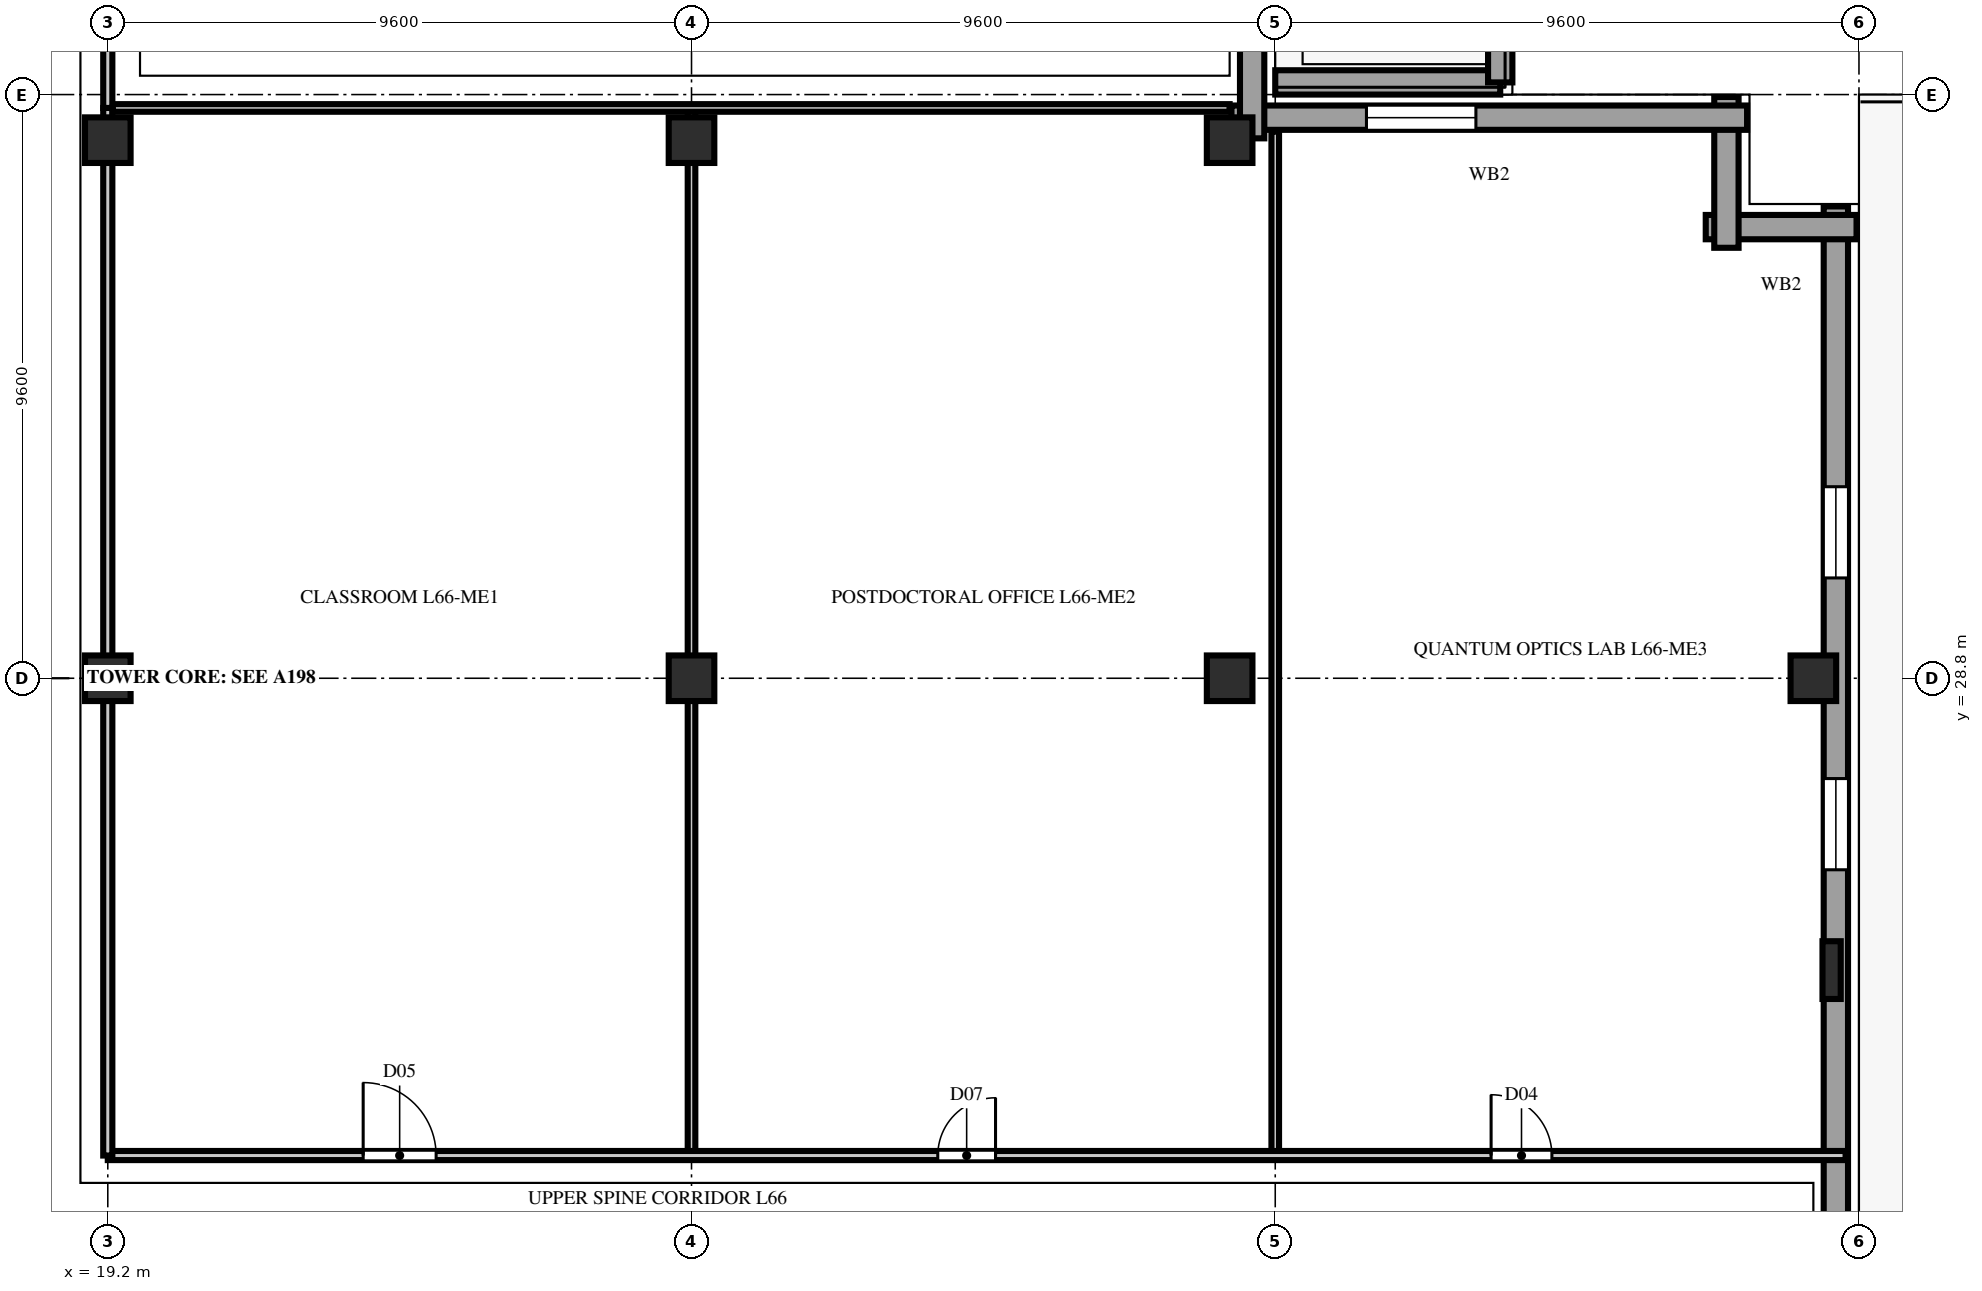
"""IFC4 building model, lengths in metres.
Left out: names, types, materials, properties, quantities, classifications, styles, units other than length and angle.
Written with IfcOpenShell. Run it as: python <this file> out.ifc"""

import sys

from ifc_helpers import new_model, si_unit, direction, frame, frame_2d, origin, origin_2d, place, context, subcontext, project, spatial, rectangle, extrude, element, fill, save


model = new_model("IFC4")
c1 = context("Model", 3, precision=1e-05, world=origin(), true_north=direction((0.0, 1.0)))
c2 = subcontext(c1, "Body", "Model", "MODEL_VIEW")
j1 = project(units=[si_unit("LENGTHUNIT", "METRE"), si_unit("PLANEANGLEUNIT", "RADIAN")], contexts=[c1])
p1 = place(None, origin())
s1 = spatial("IfcSite", under=j1, at=p1, CompositionType="ELEMENT")
p2 = place(p1, origin())
s2 = spatial("IfcBuilding", under=s1, at=p2, CompositionType="ELEMENT")
p3 = place(p2, frame((0.0, 0.0, 261.0)))
s3 = spatial("IfcBuildingStorey", under=s2, at=p3, CompositionType="ELEMENT", Elevation=261.0)
for number, where, z_axis, x_axis in (
    (1, (19.2, 28.8, 0.0), (0.0, 0.0, 1.0), (1.0, 0.0, 0.0)),
    (2, (19.2, 37.65, 0.0), (0.0, 0.0, 1.0), (1.0, 0.0, 0.0)),
    (3, (28.8, 28.8, 0.0), (0.0, 0.0, 1.0), (1.0, 0.0, 0.0)),
    (4, (28.8, 37.65, 0.0), (0.0, 0.0, 1.0), (1.0, 0.0, 0.0)),
    (5, (37.65, 28.8, 0.0), (0.0, 0.0, 1.0), (1.0, 0.0, 0.0)),
    (6, (37.65, 37.65, 0.0), (0.0, 0.0, 1.0), (1.0, 0.0, 0.0)),
    (7, (47.25, 28.8, 0.0), (0.0, 0.0, 1.0), (1.0, 0.0, 0.0)),
):
    element("IfcColumn", number, at=place(p3, frame(where, z_axis=z_axis, x_axis=x_axis)), inside=s3, PredefinedType="COLUMN", context=c2, shape_type="SweptSolid", body=[
        extrude(rectangle(XDim=0.75, YDim=0.75, at=origin_2d()), origin(), (0.0, 0.0, 1.0), 4.8),
    ])
p4 = place(p3, frame((47.55, 24.0, 0.0), z_axis=(0.0, 0.0, 1.0), x_axis=(0.0, 1.0, 0.0)))
e8 = element("IfcColumn", 8, at=p4, inside=s3, PredefinedType="PILASTER", context=c2, shape_type="SweptSolid", body=[
    extrude(rectangle(XDim=0.95, YDim=0.3, at=origin_2d()), origin(), (0.0, 0.0, 1.0), 4.8),
])
p5 = place(p3, frame((47.62, 1.84, 0.0), z_axis=(0.0, 0.0, 1.0), x_axis=(0.0, 1.0, 0.0)))
e9 = element("IfcWall", 9, at=p5, inside=s3, PredefinedType="SOLIDWALL", context=c2, shape_type="SweptSolid", body=[
    extrude(rectangle(XDim=34.72, YDim=0.4, at=frame_2d((17.36, 0.0))), origin(), (0.0, 0.0, 1.0), 4.54),
])
p6 = place(p5, frame((13.26, 0.0, 0.0)))
e10 = element("IfcOpeningElement", 10, at=p6, cuts=e9, PredefinedType="OPENING", context=c2, shape_type="SweptSolid", body=[
    extrude(rectangle(XDim=1.6, YDim=2.3, at=frame_2d((0.8, 1.15))), frame((0.0, 0.212, 0.0), z_axis=(0.0, -1.0, 0.0), x_axis=(1.0, 0.0, 0.0)), (0.0, 0.0, 1.0), 0.424),
])
p7 = place(p5, frame((4.61, 0.0, 0.85)))
e11 = element("IfcOpeningElement", 11, at=p7, cuts=e9, PredefinedType="OPENING", context=c2, shape_type="SweptSolid", body=[
    extrude(rectangle(XDim=1.5, YDim=1.85, at=frame_2d((0.75, 0.925))), frame((0.0, 0.212, 0.0), z_axis=(0.0, -1.0, 0.0), x_axis=(1.0, 0.0, 0.0)), (0.0, 0.0, 1.0), 0.424),
])
p8 = place(p5, frame((9.41, 0.0, 0.85)))
e12 = element("IfcOpeningElement", 12, at=p8, cuts=e9, PredefinedType="OPENING", context=c2, shape_type="SweptSolid", body=[
    extrude(rectangle(XDim=1.5, YDim=1.85, at=frame_2d((0.75, 0.925))), frame((0.0, 0.212, 0.0), z_axis=(0.0, -1.0, 0.0), x_axis=(1.0, 0.0, 0.0)), (0.0, 0.0, 1.0), 0.424),
])
p9 = place(p5, frame((23.81, 0.0, 0.85)))
e13 = element("IfcOpeningElement", 13, at=p9, cuts=e9, PredefinedType="OPENING", context=c2, shape_type="SweptSolid", body=[
    extrude(rectangle(XDim=1.5, YDim=1.85, at=frame_2d((0.75, 0.925))), frame((0.0, 0.212, 0.0), z_axis=(0.0, -1.0, 0.0), x_axis=(1.0, 0.0, 0.0)), (0.0, 0.0, 1.0), 0.424),
])
p10 = place(p5, frame((28.61, 0.0, 0.85)))
e14 = element("IfcOpeningElement", 14, at=p10, cuts=e9, PredefinedType="OPENING", context=c2, shape_type="SweptSolid", body=[
    extrude(rectangle(XDim=1.5, YDim=1.85, at=frame_2d((0.75, 0.925))), frame((0.0, 0.212, 0.0), z_axis=(0.0, -1.0, 0.0), x_axis=(1.0, 0.0, 0.0)), (0.0, 0.0, 1.0), 0.424),
])
p11 = place(p3, frame((47.96, 36.22, 0.0), z_axis=(0.0, 0.0, 1.0), x_axis=(-1.0, 0.0, 0.0)))
e15 = element("IfcWall", 15, at=p11, inside=s3, PredefinedType="SOLIDWALL", context=c2, shape_type="SweptSolid", body=[
    extrude(rectangle(XDim=2.48, YDim=0.4, at=frame_2d((1.24, 0.0))), origin(), (0.0, 0.0, 1.0), 4.54),
])
p12 = place(p3, frame((45.82, 35.88, 0.0), z_axis=(0.0, 0.0, 1.0), x_axis=(0.0, 1.0, 0.0)))
e16 = element("IfcWall", 16, at=p12, inside=s3, PredefinedType="SOLIDWALL", context=c2, shape_type="SweptSolid", body=[
    extrude(rectangle(XDim=2.48, YDim=0.4, at=frame_2d((1.24, 0.0))), origin(), (0.0, 0.0, 1.0), 4.54),
])
p13 = place(p3, frame((46.16, 38.02, 0.0), z_axis=(0.0, 0.0, 1.0), x_axis=(-1.0, 0.0, 0.0)))
e17 = element("IfcWall", 17, at=p13, inside=s3, PredefinedType="SOLIDWALL", context=c2, shape_type="SweptSolid", body=[
    extrude(rectangle(XDim=8.48, YDim=0.4, at=frame_2d((4.24, 0.0))), origin(), (0.0, 0.0, 1.0), 4.54),
])
p14 = place(p13, frame((4.46, 0.0, 0.85)))
e18 = element("IfcOpeningElement", 18, at=p14, cuts=e17, PredefinedType="OPENING", context=c2, shape_type="SweptSolid", body=[
    extrude(rectangle(XDim=1.8, YDim=1.85, at=frame_2d((0.9, 0.925))), frame((0.0, 0.212, 0.0), z_axis=(0.0, -1.0, 0.0), x_axis=(1.0, 0.0, 0.0)), (0.0, 0.0, 1.0), 0.424),
])
p15 = place(p3, frame((38.02, 37.68, 0.0), z_axis=(0.0, 0.0, 1.0), x_axis=(0.0, 1.0, 0.0)))
e19 = element("IfcWall", 19, at=p15, inside=s3, PredefinedType="SOLIDWALL", context=c2, shape_type="SweptSolid", body=[
    extrude(rectangle(XDim=8.48, YDim=0.4, at=frame_2d((4.24, 0.0))), origin(), (0.0, 0.0, 1.0), 4.54),
])
p16 = place(p15, frame((3.72, 0.0, 0.0)))
e20 = element("IfcOpeningElement", 20, at=p16, cuts=e19, PredefinedType="OPENING", context=c2, shape_type="SweptSolid", body=[
    extrude(rectangle(XDim=1.6, YDim=2.3, at=frame_2d((0.8, 1.15))), frame((0.0, 0.212, 0.0), z_axis=(0.0, -1.0, 0.0), x_axis=(1.0, 0.0, 0.0)), (0.0, 0.0, 1.0), 0.424),
])
p17 = place(p3, frame((38.4, 38.6, 0.0), z_axis=(0.0, 0.0, 1.0), x_axis=(1.0, 0.0, 0.0)))
e21 = element("IfcWall", 21, at=p17, inside=s3, PredefinedType="SOLIDWALL", context=c2, shape_type="SweptSolid", body=[
    extrude(rectangle(XDim=3.7, YDim=0.4, at=frame_2d((1.85, 0.0))), origin(), (0.0, 0.0, 1.0), 1.45),
])
p18 = place(p3, frame((42.1, 38.6, 0.0), z_axis=(0.0, 0.0, 1.0), x_axis=(0.0, 1.0, 0.0)))
e22 = element("IfcWall", 22, at=p18, inside=s3, PredefinedType="SOLIDWALL", context=c2, shape_type="SweptSolid", body=[
    extrude(rectangle(XDim=1.2, YDim=0.4, at=frame_2d((0.6, 0.0))), origin(), (0.0, 0.0, 1.0), 1.45),
])
p19 = place(p3, frame((28.8, 20.95, 0.0), z_axis=(0.0, 0.0, 1.0), x_axis=(0.0, 1.0, 0.0)))
e23 = element("IfcWall", 23, at=p19, inside=s3, PredefinedType="PARTITIONING", context=c2, shape_type="SweptSolid", body=[
    extrude(rectangle(XDim=17.23, YDim=0.125, at=frame_2d((8.615, 0.0))), origin(), (0.0, 0.0, 1.0), 3.628),
])
p20 = place(p3, frame((38.4, 20.95, 0.0), z_axis=(0.0, 0.0, 1.0), x_axis=(0.0, 1.0, 0.0)))
e24 = element("IfcWall", 24, at=p20, inside=s3, PredefinedType="PARTITIONING", context=c2, shape_type="SweptSolid", body=[
    extrude(rectangle(XDim=16.84, YDim=0.125, at=frame_2d((8.42, 0.0))), origin(), (0.0, 0.0, 1.0), 4.54),
])
p21 = place(p3, frame((19.2, 20.95, 0.0), z_axis=(0.0, 0.0, 1.0), x_axis=(1.0, 0.0, 0.0)))
e25 = element("IfcWall", 25, at=p21, inside=s3, PredefinedType="PARTITIONING", context=c2, shape_type="SweptSolid", body=[
    extrude(rectangle(XDim=28.58, YDim=0.15, at=frame_2d((14.29, 0.0))), origin(), (0.0, 0.0, 1.0), 4.54),
])
p22 = place(p21, frame((4.2, 0.0, 0.0)))
e26 = element("IfcOpeningElement", 26, at=p22, cuts=e25, PredefinedType="OPENING", context=c2, shape_type="SweptSolid", body=[
    extrude(rectangle(XDim=1.2, YDim=2.2, at=frame_2d((0.6, 1.1))), frame((0.0, 0.087, 0.0), z_axis=(0.0, -1.0, 0.0), x_axis=(1.0, 0.0, 0.0)), (0.0, 0.0, 1.0), 0.174),
])
p23 = place(p21, frame((13.65, 0.0, 0.0)))
e27 = element("IfcOpeningElement", 27, at=p23, cuts=e25, PredefinedType="OPENING", context=c2, shape_type="SweptSolid", body=[
    extrude(rectangle(XDim=0.95, YDim=2.15, at=frame_2d((0.475, 1.075))), frame((0.0, 0.087, 0.0), z_axis=(0.0, -1.0, 0.0), x_axis=(1.0, 0.0, 0.0)), (0.0, 0.0, 1.0), 0.174),
])
p24 = place(p21, frame((22.75, 0.0, 0.0)))
e28 = element("IfcOpeningElement", 28, at=p24, cuts=e25, PredefinedType="OPENING", context=c2, shape_type="SweptSolid", body=[
    extrude(rectangle(XDim=1.0, YDim=2.2, at=frame_2d((0.5, 1.1))), frame((0.0, 0.087, 0.0), z_axis=(0.0, -1.0, 0.0), x_axis=(1.0, 0.0, 0.0)), (0.0, 0.0, 1.0), 0.174),
])
p25 = place(p3, frame((19.2, 20.95, 0.0), z_axis=(0.0, 0.0, 1.0), x_axis=(0.0, 1.0, 0.0)))
e29 = element("IfcWall", 29, at=p25, inside=s3, PredefinedType="PARTITIONING", context=c2, shape_type="SweptSolid", body=[
    extrude(rectangle(XDim=17.23, YDim=0.15, at=frame_2d((8.615, 0.0))), origin(), (0.0, 0.0, 1.0), 3.628),
])
p26 = place(p3, frame((19.28, 38.18, 0.0), z_axis=(0.0, 0.0, 1.0), x_axis=(1.0, 0.0, 0.0)))
e30 = element("IfcWall", 30, at=p26, inside=s3, PredefinedType="PARTITIONING", context=c2, shape_type="SweptSolid", body=[
    extrude(rectangle(XDim=18.37, YDim=0.125, at=frame_2d((9.185, 0.0))), origin(), (0.0, 0.0, 1.0), 4.54),
])
p27 = place(p3, frame((19.2, 38.18, 0.0), z_axis=(0.0, 0.0, 1.0), x_axis=(0.0, 1.0, 0.0)))
e31 = element("IfcWall", 31, at=p27, inside=s3, PredefinedType="PARTITIONING", context=c2, shape_type="SweptSolid", body=[
    extrude(rectangle(XDim=9.27, YDim=0.15, at=frame_2d((4.635, 0.0))), origin(), (0.0, 0.0, 1.0), 3.628),
])
p28 = place(p27, frame((3.65, 0.0, 0.0)))
e32 = element("IfcOpeningElement", 32, at=p28, cuts=e31, PredefinedType="OPENING", context=c2, shape_type="SweptSolid", body=[
    extrude(rectangle(XDim=1.2, YDim=2.2, at=frame_2d((0.6, 1.1))), frame((0.0, 0.087, 0.0), z_axis=(0.0, -1.0, 0.0), x_axis=(1.0, 0.0, 0.0)), (0.0, 0.0, 1.0), 0.174),
])
p29 = place(p9, origin())
e33 = element("IfcWindow", 33, at=p29, inside=s3, PartitioningType="DOUBLE_PANEL_VERTICAL", PredefinedType="WINDOW", context=c2, shape_type="SweptSolid", body=[
    extrude(rectangle(XDim=1.5, YDim=1.85, at=frame_2d((0.75, 0.925))), frame((0.0, 0.11, 0.0), z_axis=(0.0, -1.0, 0.0), x_axis=(1.0, 0.0, 0.0)), (0.0, 0.0, 1.0), 0.06),
])
fill(e13, e33)
p30 = place(p10, origin())
e34 = element("IfcWindow", 34, at=p30, inside=s3, PartitioningType="DOUBLE_PANEL_VERTICAL", PredefinedType="WINDOW", context=c2, shape_type="SweptSolid", body=[
    extrude(rectangle(XDim=1.5, YDim=1.85, at=frame_2d((0.75, 0.925))), frame((0.0, 0.11, 0.0), z_axis=(0.0, -1.0, 0.0), x_axis=(1.0, 0.0, 0.0)), (0.0, 0.0, 1.0), 0.06),
])
fill(e14, e34)
p31 = place(p14, origin())
e35 = element("IfcWindow", 35, at=p31, inside=s3, PartitioningType="DOUBLE_PANEL_VERTICAL", PredefinedType="WINDOW", context=c2, shape_type="SweptSolid", body=[
    extrude(rectangle(XDim=1.8, YDim=1.85, at=frame_2d((0.9, 0.925))), frame((0.0, 0.11, 0.0), z_axis=(0.0, -1.0, 0.0), x_axis=(1.0, 0.0, 0.0)), (0.0, 0.0, 1.0), 0.06),
])
fill(e18, e35)
p32 = place(p22, origin())
e36 = element("IfcDoor", 36, at=p32, inside=s3, OperationType="SINGLE_SWING_LEFT", PredefinedType="DOOR", context=c2, shape_type="SweptSolid", body=[
    extrude(rectangle(XDim=1.2, YDim=2.2, at=frame_2d((0.6, 1.1))), frame((0.0, 0.025, 0.0), z_axis=(0.0, -1.0, 0.0), x_axis=(1.0, 0.0, 0.0)), (0.0, 0.0, 1.0), 0.05),
])
fill(e26, e36)
p33 = place(p23, origin())
e37 = element("IfcDoor", 37, at=p33, inside=s3, OperationType="SINGLE_SWING_RIGHT", PredefinedType="DOOR", context=c2, shape_type="SweptSolid", body=[
    extrude(rectangle(XDim=0.95, YDim=2.15, at=frame_2d((0.475, 1.075))), frame((0.0, 0.025, 0.0), z_axis=(0.0, -1.0, 0.0), x_axis=(1.0, 0.0, 0.0)), (0.0, 0.0, 1.0), 0.05),
])
fill(e27, e37)
p34 = place(p24, origin())
e38 = element("IfcDoor", 38, at=p34, inside=s3, OperationType="SINGLE_SWING_LEFT", PredefinedType="DOOR", context=c2, shape_type="SweptSolid", body=[
    extrude(rectangle(XDim=1.0, YDim=2.2, at=frame_2d((0.5, 1.1))), frame((0.0, 0.025, 0.0), z_axis=(0.0, -1.0, 0.0), x_axis=(1.0, 0.0, 0.0)), (0.0, 0.0, 1.0), 0.05),
])
fill(e28, e38)
save(model, sys.argv[1])
